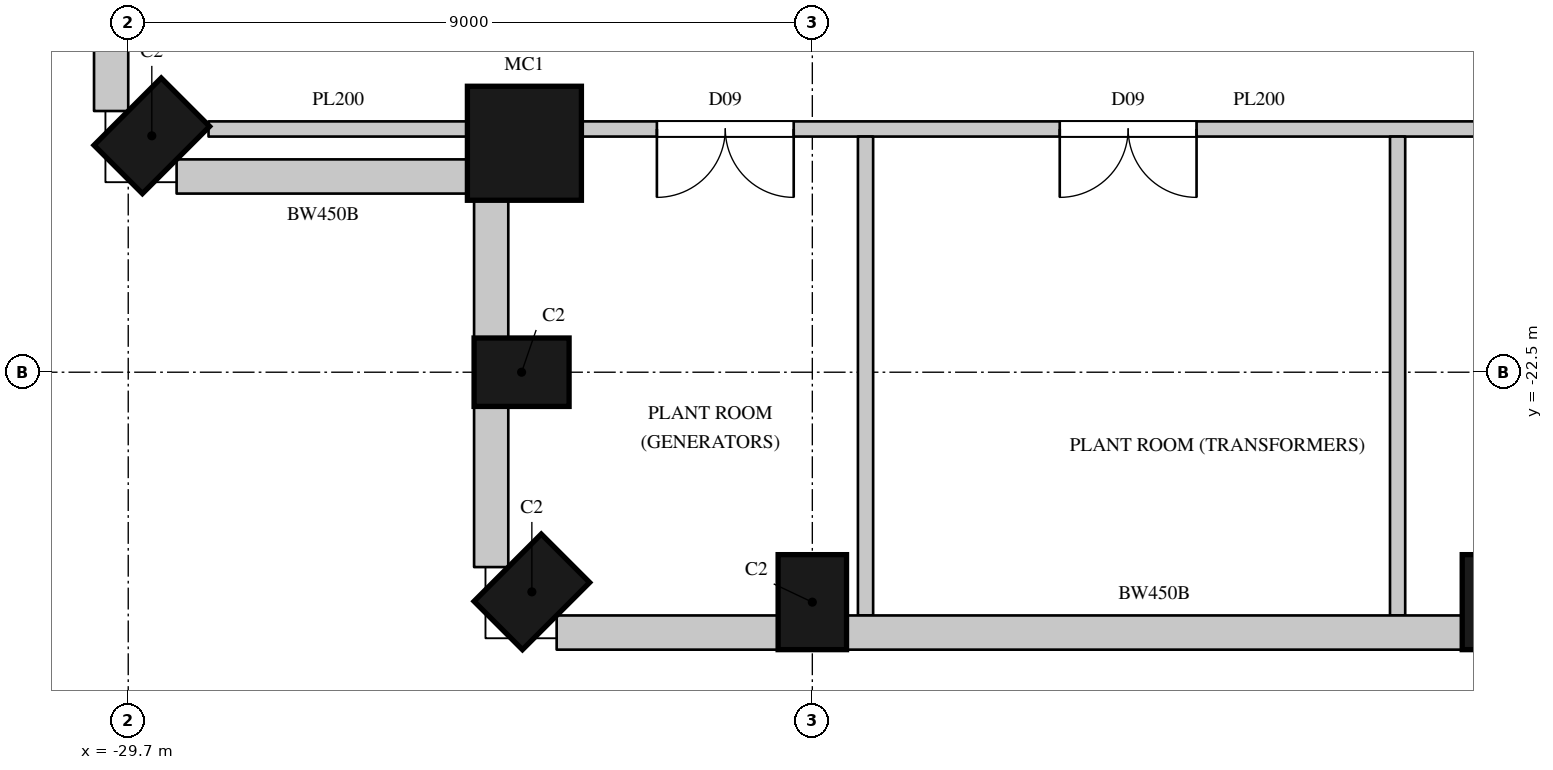
"""IFC4 building model, lengths in metres.
Left out: names, types, materials, properties, quantities, classifications, styles, units other than length and angle.
Written with IfcOpenShell. Run it as: python <this file> out.ifc"""

import sys

from ifc_helpers import new_model, si_unit, direction, frame, frame_2d, origin, origin_2d, place, context, subcontext, project, spatial, rectangle, circle, extrude, element, fill, save


model = new_model("IFC4")
c1 = context("Model", 3, precision=1e-05, world=origin(), true_north=direction((0.0, 1.0)))
c2 = subcontext(c1, "Body", "Model", "MODEL_VIEW")
j1 = project(units=[si_unit("LENGTHUNIT", "METRE"), si_unit("PLANEANGLEUNIT", "RADIAN")], contexts=[c1])
p1 = place(None, origin())
s1 = spatial("IfcSite", under=j1, at=p1, CompositionType="ELEMENT")
p2 = place(p1, origin())
s2 = spatial("IfcBuilding", under=s1, at=p2, CompositionType="ELEMENT")
p3 = place(p2, frame((0.0, 0.0, 152.5)))
s3 = spatial("IfcBuildingStorey", under=s2, at=p3, CompositionType="ELEMENT", Elevation=152.5)
p4 = place(p3, frame((-29.39, -19.39, 0.0), z_axis=(0.0, 0.0, 1.0), x_axis=(0.707106781187, -0.707106781187, 0.0)))
e1 = element("IfcColumn", 1, at=p4, inside=s3, PredefinedType="COLUMN", context=c2, shape_type="SweptSolid", body=[
    extrude(rectangle(XDim=0.9, YDim=1.25, at=origin_2d()), origin(), (0.0, 0.0, 1.0), 8.0),
])
p5 = place(p3, frame((-24.488, -19.488, 0.0), z_axis=(0.0, 0.0, 1.0), x_axis=(1.0, 0.0, 0.0)))
e2 = element("IfcColumn", 2, at=p5, inside=s3, PredefinedType="COLUMN", context=c2, shape_type="SweptSolid", body=[
    extrude(circle(Radius=0.75, at=origin_2d()), origin(), (0.0, 0.0, 1.0), 8.0),
])
for number, where, z_axis, x_axis in (
    (3, (-24.525, -22.5, 0.0), (0.0, 0.0, 1.0), (0.0, -1.0, 0.0)),
    (4, (-24.39, -25.39, 0.0), (0.0, 0.0, 1.0), (0.707, -0.707, 0.0)),
    (5, (-20.7, -25.525, 0.0), (0.0, 0.0, 1.0), (1.0, 0.0, 0.0)),
    (6, (-11.7, -25.525, 0.0), (0.0, 0.0, 1.0), (1.0, 0.0, 0.0)),
):
    element("IfcColumn", number, at=place(p3, frame(where, z_axis=z_axis, x_axis=x_axis)), inside=s3, PredefinedType="COLUMN", context=c2, shape_type="SweptSolid", body=[
        extrude(rectangle(XDim=0.9, YDim=1.25, at=origin_2d()), origin(), (0.0, 0.0, 1.0), 8.0),
    ])
p6 = place(p3, frame((-29.925, -16.0, 0.0), z_axis=(0.0, 0.0, 1.0), x_axis=(0.0, -1.0, 0.0)))
e7 = element("IfcWall", 7, at=p6, inside=s3, PredefinedType="SOLIDWALL", context=c2, shape_type="SweptSolid", body=[
    extrude(rectangle(XDim=3.064, YDim=0.45, at=frame_2d((1.532, 0.0))), origin(), (0.0, 0.0, 1.0), 6.4),
])
p7 = place(p3, frame((-29.064, -19.925, 0.0), z_axis=(0.0, 0.0, 1.0), x_axis=(1.0, 0.0, 0.0)))
e8 = element("IfcWall", 8, at=p7, inside=s3, PredefinedType="SOLIDWALL", context=c2, shape_type="SweptSolid", body=[
    extrude(rectangle(XDim=3.857, YDim=0.45, at=frame_2d((1.928, 0.0))), origin(), (0.0, 0.0, 1.0), 7.7),
])
p8 = place(p3, frame((-24.925, -20.207, 0.0), z_axis=(0.0, 0.0, 1.0), x_axis=(0.0, -1.0, 0.0)))
e9 = element("IfcWall", 9, at=p8, inside=s3, PredefinedType="SOLIDWALL", context=c2, shape_type="SweptSolid", body=[
    extrude(rectangle(XDim=1.843, YDim=0.45, at=frame_2d((0.921, 0.0))), origin(), (0.0, 0.0, 1.0), 7.7),
])
p9 = place(p3, frame((-24.925, -22.95, 0.0), z_axis=(0.0, 0.0, 1.0), x_axis=(0.0, -1.0, 0.0)))
e10 = element("IfcWall", 10, at=p9, inside=s3, PredefinedType="SOLIDWALL", context=c2, shape_type="SweptSolid", body=[
    extrude(rectangle(XDim=2.114, YDim=0.45, at=frame_2d((1.057, 0.0))), origin(), (0.0, 0.0, 1.0), 7.7),
])
p10 = place(p3, frame((-24.064, -25.925, 0.0), z_axis=(0.0, 0.0, 1.0), x_axis=(1.0, 0.0, 0.0)))
e11 = element("IfcWall", 11, at=p10, inside=s3, PredefinedType="SOLIDWALL", context=c2, shape_type="SweptSolid", body=[
    extrude(rectangle(XDim=2.914, YDim=0.45, at=frame_2d((1.457, 0.0))), origin(), (0.0, 0.0, 1.0), 7.7),
])
p11 = place(p3, frame((-20.25, -25.925, 0.0), z_axis=(0.0, 0.0, 1.0), x_axis=(1.0, 0.0, 0.0)))
e12 = element("IfcWall", 12, at=p11, inside=s3, PredefinedType="SOLIDWALL", context=c2, shape_type="SweptSolid", body=[
    extrude(rectangle(XDim=8.1, YDim=0.45, at=frame_2d((4.05, 0.0))), origin(), (0.0, 0.0, 1.0), 7.7),
])
p12 = place(p3, frame((-28.644, -19.3, 0.0), z_axis=(0.0, 0.0, 1.0), x_axis=(1.0, 0.0, 0.0)))
e13 = element("IfcWall", 13, at=p12, inside=s3, PredefinedType="PARTITIONING", context=c2, shape_type="SweptSolid", body=[
    extrude(rectangle(XDim=3.413, YDim=0.2, at=frame_2d((1.706, 0.0))), origin(), (0.0, 0.0, 1.0), 7.7),
])
p13 = place(p3, frame((-23.745, -19.3, 0.0), z_axis=(0.0, 0.0, 1.0), x_axis=(1.0, 0.0, 0.0)))
e14 = element("IfcWall", 14, at=p13, inside=s3, PredefinedType="PARTITIONING", context=c2, shape_type="SweptSolid", body=[
    extrude(rectangle(XDim=17.845, YDim=0.2, at=frame_2d((8.922, 0.0))), origin(), (0.0, 0.0, 1.0), 7.25),
])
p14 = place(p13, frame((1.0, 0.0, 0.0)))
e15 = element("IfcOpeningElement", 15, at=p14, cuts=e14, PredefinedType="OPENING", context=c2, shape_type="SweptSolid", body=[
    extrude(rectangle(XDim=1.8, YDim=2.4, at=frame_2d((0.9, 1.2))), frame((0.0, 0.11, 0.0), z_axis=(0.0, -1.0, 0.0), x_axis=(1.0, 0.0, 0.0)), (0.0, 0.0, 1.0), 0.22),
])
p15 = place(p13, frame((6.3, 0.0, 0.0)))
e16 = element("IfcOpeningElement", 16, at=p15, cuts=e14, PredefinedType="OPENING", context=c2, shape_type="SweptSolid", body=[
    extrude(rectangle(XDim=1.8, YDim=2.4, at=frame_2d((0.9, 1.2))), frame((0.0, 0.11, 0.0), z_axis=(0.0, -1.0, 0.0), x_axis=(1.0, 0.0, 0.0)), (0.0, 0.0, 1.0), 0.22),
])
p16 = place(p13, frame((13.3, 0.0, 0.0)))
e17 = element("IfcOpeningElement", 17, at=p16, cuts=e14, PredefinedType="OPENING", context=c2, shape_type="SweptSolid", body=[
    extrude(rectangle(XDim=1.8, YDim=2.4, at=frame_2d((0.9, 1.2))), frame((0.0, 0.11, 0.0), z_axis=(0.0, -1.0, 0.0), x_axis=(1.0, 0.0, 0.0)), (0.0, 0.0, 1.0), 0.22),
])
for number, where, z_axis, x_axis in (
    (18, (-20.0, -25.7, 0.0), (0.0, 0.0, 1.0), (0.0, 1.0, 0.0)),
    (19, (-13.0, -25.7, 0.0), (0.0, 0.0, 1.0), (0.0, 1.0, 0.0)),
):
    element("IfcWall", number, at=place(p3, frame(where, z_axis=z_axis, x_axis=x_axis)), inside=s3, PredefinedType="PARTITIONING", context=c2, shape_type="SweptSolid", body=[
        extrude(rectangle(XDim=6.3, YDim=0.2, at=frame_2d((3.15, 0.0))), origin(), (0.0, 0.0, 1.0), 7.7),
    ])
p17 = place(p14, origin())
e20 = element("IfcDoor", 20, at=p17, inside=s3, OperationType="DOUBLE_DOOR_SINGLE_SWING", PredefinedType="DOOR", context=c2, shape_type="SweptSolid", body=[
    extrude(rectangle(XDim=1.8, YDim=2.4, at=frame_2d((0.9, 1.2))), frame((0.0, 0.025, 0.0), z_axis=(0.0, -1.0, 0.0), x_axis=(1.0, 0.0, 0.0)), (0.0, 0.0, 1.0), 0.05),
])
fill(e15, e20)
p18 = place(p15, origin())
e21 = element("IfcDoor", 21, at=p18, inside=s3, OperationType="DOUBLE_DOOR_SINGLE_SWING", PredefinedType="DOOR", context=c2, shape_type="SweptSolid", body=[
    extrude(rectangle(XDim=1.8, YDim=2.4, at=frame_2d((0.9, 1.2))), frame((0.0, 0.025, 0.0), z_axis=(0.0, -1.0, 0.0), x_axis=(1.0, 0.0, 0.0)), (0.0, 0.0, 1.0), 0.05),
])
fill(e16, e21)
save(model, sys.argv[1])
